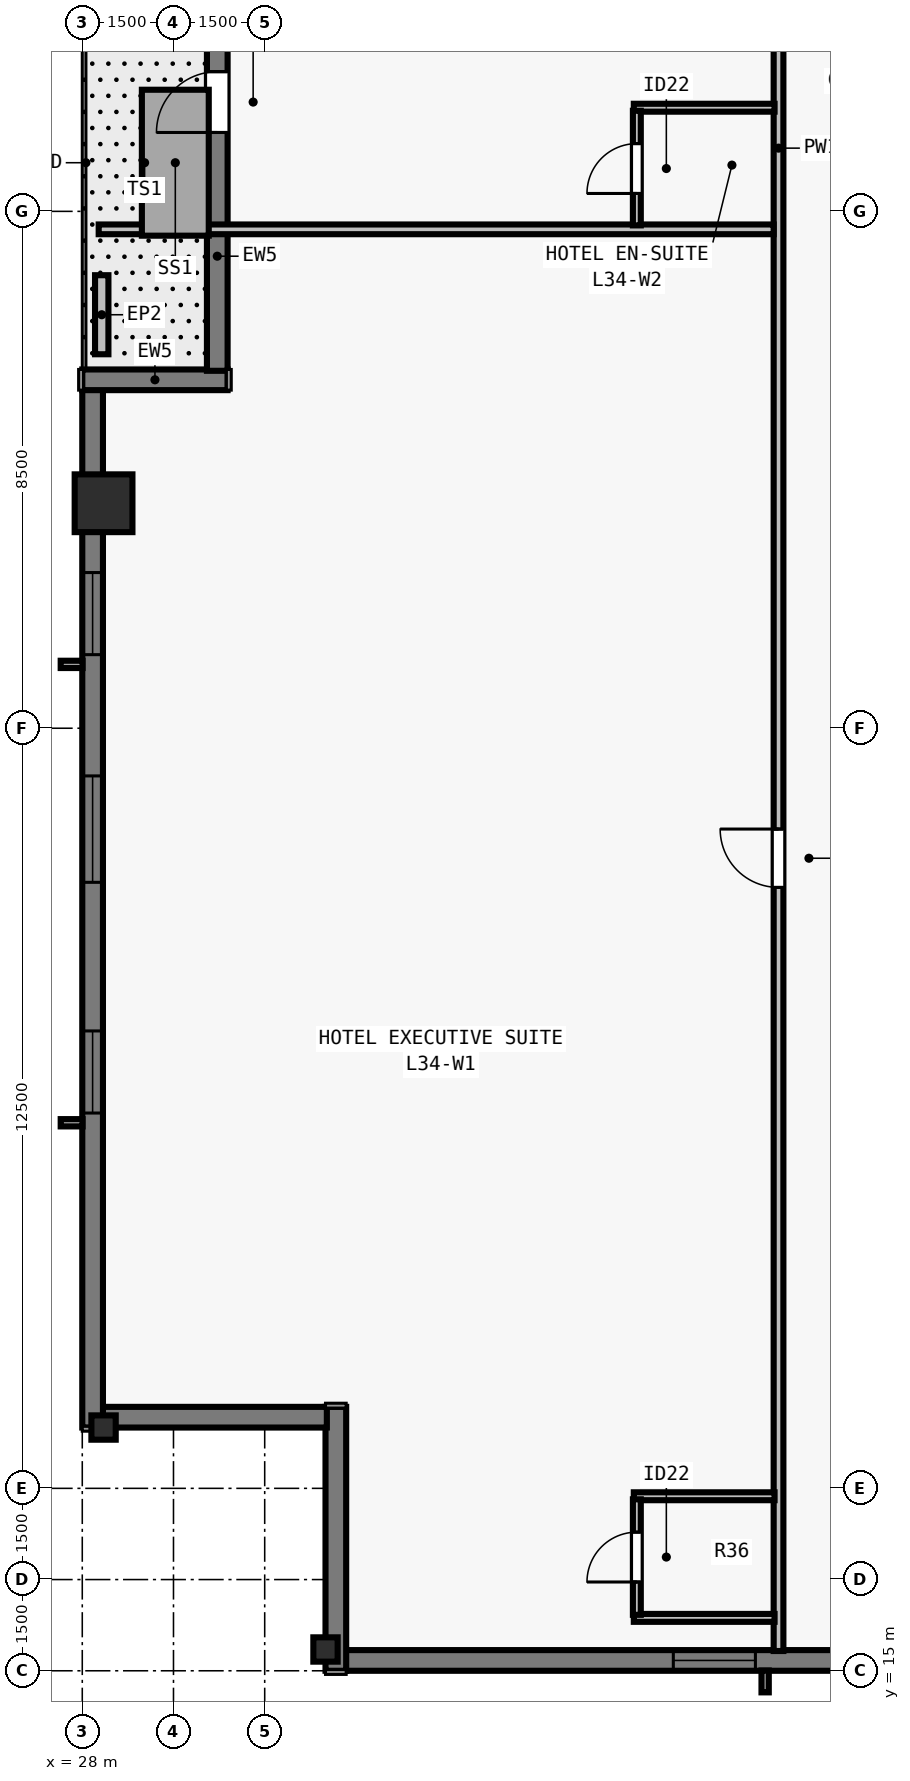
"""IFC4 building model, lengths in metres.
Left out: names, types, materials, properties, quantities, classifications, styles, units other than length and angle.
Written with IfcOpenShell. Run it as: python <this file> out.ifc"""

import sys

from ifc_helpers import new_model, si_unit, direction, frame, frame_2d, origin, origin_2d, place, context, subcontext, project, spatial, rectangle, i_section, extrude, element, fill, save


model = new_model("IFC4")
c1 = context("Model", 3, precision=1e-05, world=origin(), true_north=direction((0.0, 1.0)))
c2 = subcontext(c1, "Body", "Model", "MODEL_VIEW")
j1 = project(units=[si_unit("LENGTHUNIT", "METRE"), si_unit("PLANEANGLEUNIT", "RADIAN")], contexts=[c1])
p1 = place(None, origin())
s1 = spatial("IfcSite", under=j1, at=p1, CompositionType="ELEMENT")
p2 = place(p1, origin())
s2 = spatial("IfcBuilding", under=s1, at=p2, CompositionType="ELEMENT")
p3 = place(p2, frame((0.0, 0.0, 127.0)))
s3 = spatial("IfcBuildingStorey", under=s2, at=p3, CompositionType="ELEMENT", Elevation=127.0)
p4 = place(p3, frame((32.0, 15.35, 0.0), z_axis=(0.0, 0.0, 1.0), x_axis=(1.0, 0.0, 0.0)))
e1 = element("IfcColumn", 1, at=p4, inside=s3, PredefinedType="COLUMN", context=c2, shape_type="SweptSolid", body=[
    extrude(i_section(OverallWidth=0.4, OverallDepth=0.4, WebThickness=0.022, FlangeThickness=0.036, at=origin_2d()), origin(), (0.0, 0.0, 1.0), 3.5),
])
p5 = place(p3, frame((28.35, 34.2, 0.0), z_axis=(0.0, 0.0, 1.0), x_axis=(0.0, 1.0, 0.0)))
e2 = element("IfcColumn", 2, at=p5, inside=s3, PredefinedType="COLUMN", context=c2, shape_type="SweptSolid", body=[
    extrude(rectangle(XDim=0.95, YDim=0.95, at=origin_2d()), origin(), (0.0, 0.0, 1.0), 3.5),
])
p6 = place(p3, frame((28.35, 19.0, 0.0), z_axis=(0.0, 0.0, 1.0), x_axis=(0.0, 1.0, 0.0)))
e3 = element("IfcColumn", 3, at=p6, inside=s3, PredefinedType="COLUMN", context=c2, shape_type="SweptSolid", body=[
    extrude(i_section(OverallWidth=0.4, OverallDepth=0.4, WebThickness=0.022, FlangeThickness=0.036, at=origin_2d()), origin(), (0.0, 0.0, 1.0), 3.5),
])
p7 = place(p3, frame((72.0, 15.17, 0.0), z_axis=(0.0, 0.0, 1.0), x_axis=(-1.0, 0.0, 0.0)))
e4 = element("IfcWall", 4, at=p7, inside=s3, PredefinedType="SOLIDWALL", context=c2, shape_type="SweptSolid", body=[
    extrude(rectangle(XDim=39.682, YDim=0.34, at=frame_2d((19.841, 0.0))), origin(), (0.0, 0.0, 1.0), 3.28),
])
p8 = place(p7, frame((8.755, 0.0, 0.8)))
e5 = element("IfcOpeningElement", 5, at=p8, cuts=e4, PredefinedType="OPENING", context=c2, shape_type="SweptSolid", body=[
    extrude(rectangle(XDim=1.75, YDim=1.66, at=frame_2d((0.875, 0.83))), frame((0.0, 0.18, 0.0), z_axis=(0.0, -1.0, 0.0), x_axis=(1.0, 0.0, 0.0)), (0.0, 0.0, 1.0), 0.36),
])
p9 = place(p7, frame((12.059, 0.0, 0.8)))
e6 = element("IfcOpeningElement", 6, at=p9, cuts=e4, PredefinedType="OPENING", context=c2, shape_type="SweptSolid", body=[
    extrude(rectangle(XDim=1.35, YDim=1.66, at=frame_2d((0.675, 0.83))), frame((0.0, 0.18, 0.0), z_axis=(0.0, -1.0, 0.0), x_axis=(1.0, 0.0, 0.0)), (0.0, 0.0, 1.0), 0.36),
])
p10 = place(p7, frame((16.262, 0.0, 0.8)))
e7 = element("IfcOpeningElement", 7, at=p10, cuts=e4, PredefinedType="OPENING", context=c2, shape_type="SweptSolid", body=[
    extrude(rectangle(XDim=1.75, YDim=1.66, at=frame_2d((0.875, 0.83))), frame((0.0, 0.18, 0.0), z_axis=(0.0, -1.0, 0.0), x_axis=(1.0, 0.0, 0.0)), (0.0, 0.0, 1.0), 0.36),
])
p11 = place(p7, frame((19.166, 0.0, 0.8)))
e8 = element("IfcOpeningElement", 8, at=p11, cuts=e4, PredefinedType="OPENING", context=c2, shape_type="SweptSolid", body=[
    extrude(rectangle(XDim=1.35, YDim=1.66, at=frame_2d((0.675, 0.83))), frame((0.0, 0.18, 0.0), z_axis=(0.0, -1.0, 0.0), x_axis=(1.0, 0.0, 0.0)), (0.0, 0.0, 1.0), 0.36),
])
p12 = place(p7, frame((21.27, 0.0, 0.8)))
e9 = element("IfcOpeningElement", 9, at=p12, cuts=e4, PredefinedType="OPENING", context=c2, shape_type="SweptSolid", body=[
    extrude(rectangle(XDim=1.75, YDim=1.66, at=frame_2d((0.875, 0.83))), frame((0.0, 0.18, 0.0), z_axis=(0.0, -1.0, 0.0), x_axis=(1.0, 0.0, 0.0)), (0.0, 0.0, 1.0), 0.36),
])
p13 = place(p7, frame((26.273, 0.0, 0.8)))
e10 = element("IfcOpeningElement", 10, at=p13, cuts=e4, PredefinedType="OPENING", context=c2, shape_type="SweptSolid", body=[
    extrude(rectangle(XDim=1.35, YDim=1.66, at=frame_2d((0.675, 0.83))), frame((0.0, 0.18, 0.0), z_axis=(0.0, -1.0, 0.0), x_axis=(1.0, 0.0, 0.0)), (0.0, 0.0, 1.0), 0.36),
])
p14 = place(p7, frame((28.377, 0.0, 0.8)))
e11 = element("IfcOpeningElement", 11, at=p14, cuts=e4, PredefinedType="OPENING", context=c2, shape_type="SweptSolid", body=[
    extrude(rectangle(XDim=1.75, YDim=1.66, at=frame_2d((0.875, 0.83))), frame((0.0, 0.18, 0.0), z_axis=(0.0, -1.0, 0.0), x_axis=(1.0, 0.0, 0.0)), (0.0, 0.0, 1.0), 0.36),
])
p15 = place(p7, frame((32.93, 0.0, 0.8)))
e12 = element("IfcOpeningElement", 12, at=p15, cuts=e4, PredefinedType="OPENING", context=c2, shape_type="SweptSolid", body=[
    extrude(rectangle(XDim=1.35, YDim=1.66, at=frame_2d((0.675, 0.83))), frame((0.0, 0.18, 0.0), z_axis=(0.0, -1.0, 0.0), x_axis=(1.0, 0.0, 0.0)), (0.0, 0.0, 1.0), 0.36),
])
p16 = place(p3, frame((32.17, 15.0, 0.0), z_axis=(0.0, 0.0, 1.0), x_axis=(0.0, 1.0, 0.0)))
e13 = element("IfcWall", 13, at=p16, inside=s3, PredefinedType="SOLIDWALL", context=c2, shape_type="SweptSolid", body=[
    extrude(rectangle(XDim=4.34, YDim=0.34, at=frame_2d((2.17, 0.0))), origin(), (0.0, 0.0, 1.0), 3.28),
])
p17 = place(p3, frame((32.022, 19.17, 0.0), z_axis=(0.0, 0.0, 1.0), x_axis=(-1.0, 0.0, 0.0)))
e14 = element("IfcWall", 14, at=p17, inside=s3, PredefinedType="SOLIDWALL", context=c2, shape_type="SweptSolid", body=[
    extrude(rectangle(XDim=3.704, YDim=0.34, at=frame_2d((1.852, 0.0))), origin(), (0.0, 0.0, 1.0), 3.28),
])
p18 = place(p3, frame((28.17, 19.0, 0.0), z_axis=(0.0, 0.0, 1.0), x_axis=(0.0, 1.0, 0.0)))
e15 = element("IfcWall", 15, at=p18, inside=s3, PredefinedType="SOLIDWALL", context=c2, shape_type="SweptSolid", body=[
    extrude(rectangle(XDim=17.082, YDim=0.34, at=frame_2d((8.541, 0.0))), origin(), (0.0, 0.0, 1.0), 3.28),
])
p19 = place(p18, frame((5.172, 0.0, 0.8)))
e16 = element("IfcOpeningElement", 16, at=p19, cuts=e15, PredefinedType="OPENING", context=c2, shape_type="SweptSolid", body=[
    extrude(rectangle(XDim=1.35, YDim=1.66, at=frame_2d((0.675, 0.83))), frame((0.0, 0.18, 0.0), z_axis=(0.0, -1.0, 0.0), x_axis=(1.0, 0.0, 0.0)), (0.0, 0.0, 1.0), 0.36),
])
p20 = place(p18, frame((8.966, 0.0, 0.8)))
e17 = element("IfcOpeningElement", 17, at=p20, cuts=e15, PredefinedType="OPENING", context=c2, shape_type="SweptSolid", body=[
    extrude(rectangle(XDim=1.75, YDim=1.66, at=frame_2d((0.875, 0.83))), frame((0.0, 0.18, 0.0), z_axis=(0.0, -1.0, 0.0), x_axis=(1.0, 0.0, 0.0)), (0.0, 0.0, 1.0), 0.36),
])
p21 = place(p18, frame((12.71, 0.0, 0.8)))
e18 = element("IfcOpeningElement", 18, at=p21, cuts=e15, PredefinedType="OPENING", context=c2, shape_type="SweptSolid", body=[
    extrude(rectangle(XDim=1.35, YDim=1.66, at=frame_2d((0.675, 0.83))), frame((0.0, 0.18, 0.0), z_axis=(0.0, -1.0, 0.0), x_axis=(1.0, 0.0, 0.0)), (0.0, 0.0, 1.0), 0.36),
])
p22 = place(p3, frame((28.0, 36.23, 0.0), z_axis=(0.0, 0.0, 1.0), x_axis=(1.0, 0.0, 0.0)))
e19 = element("IfcWall", 19, at=p22, inside=s3, PredefinedType="SOLIDWALL", context=c2, shape_type="SweptSolid", body=[
    extrude(rectangle(XDim=2.39, YDim=0.34, at=frame_2d((1.195, 0.0))), origin(), (0.0, 0.0, 1.0), 3.28),
])
p23 = place(p3, frame((30.22, 36.378, 0.0), z_axis=(0.0, 0.0, 1.0), x_axis=(0.0, 1.0, 0.0)))
e20 = element("IfcWall", 20, at=p23, inside=s3, PredefinedType="SOLIDWALL", context=c2, shape_type="SweptSolid", body=[
    extrude(rectangle(XDim=7.162, YDim=0.34, at=frame_2d((3.581, 0.0))), origin(), (0.0, 0.0, 1.0), 3.28),
])
p24 = place(p23, frame((3.919, 0.0, 0.0)))
e21 = element("IfcOpeningElement", 21, at=p24, cuts=e20, PredefinedType="OPENING", context=c2, shape_type="SweptSolid", body=[
    extrude(rectangle(XDim=1.0, YDim=2.15, at=frame_2d((0.5, 1.075))), frame((0.0, 0.18, 0.0), z_axis=(0.0, -1.0, 0.0), x_axis=(1.0, 0.0, 0.0)), (0.0, 0.0, 1.0), 0.36),
])
p25 = place(p3, frame((28.32, 36.65, 0.0), z_axis=(0.0, 0.0, 1.0), x_axis=(0.0, 1.0, 0.0)))
e22 = element("IfcWall", 22, at=p25, inside=s3, PredefinedType="PARAPET", context=c2, shape_type="SweptSolid", body=[
    extrude(rectangle(XDim=1.3, YDim=0.22, at=frame_2d((0.65, 0.0))), origin(), (0.0, 0.0, 1.0), 0.55),
])
p26 = place(p3, frame((39.45, 15.325, 0.0), z_axis=(0.0, 0.0, 1.0), x_axis=(0.0, 1.0, 0.0)))
e23 = element("IfcWall", 23, at=p26, inside=s3, PredefinedType="PARTITIONING", context=c2, shape_type="SweptSolid", body=[
    extrude(rectangle(XDim=47.35, YDim=0.16, at=frame_2d((23.675, 0.0))), origin(), (0.0, 0.0, 1.0), 2.555),
])
p27 = place(p26, frame((12.557, 0.0, 0.0)))
e24 = element("IfcOpeningElement", 24, at=p27, cuts=e23, PredefinedType="OPENING", context=c2, shape_type="SweptSolid", body=[
    extrude(rectangle(XDim=0.96, YDim=2.15, at=frame_2d((0.48, 1.075))), frame((0.0, 0.09, 0.0), z_axis=(0.0, -1.0, 0.0), x_axis=(1.0, 0.0, 0.0)), (0.0, 0.0, 1.0), 0.18),
])
p28 = place(p26, frame((35.912, 0.0, 0.0)))
e25 = element("IfcOpeningElement", 25, at=p28, cuts=e23, PredefinedType="OPENING", context=c2, shape_type="SweptSolid", body=[
    extrude(rectangle(XDim=0.96, YDim=2.15, at=frame_2d((0.48, 1.075))), frame((0.0, 0.09, 0.0), z_axis=(0.0, -1.0, 0.0), x_axis=(1.0, 0.0, 0.0)), (0.0, 0.0, 1.0), 0.18),
])
for number, where, z_axis, x_axis in (
    (26, (37.07, 15.87, 0.0), (0.0, 0.0, 1.0), (1.0, 0.0, 0.0)),
    (27, (37.07, 17.87, 0.0), (0.0, 0.0, 1.0), (1.0, 0.0, 0.0)),
):
    element("IfcWall", number, at=place(p3, frame(where, z_axis=z_axis, x_axis=x_axis)), inside=s3, PredefinedType="PLUMBINGWALL", context=c2, shape_type="SweptSolid", body=[
        extrude(rectangle(XDim=2.315, YDim=0.13, at=frame_2d((1.157, 0.0))), origin(), (0.0, 0.0, 1.0), 3.28),
    ])
p29 = place(p3, frame((37.12, 15.92, 0.0), z_axis=(0.0, 0.0, 1.0), x_axis=(0.0, 1.0, 0.0)))
e28 = element("IfcWall", 28, at=p29, inside=s3, PredefinedType="PLUMBINGWALL", context=c2, shape_type="SweptSolid", body=[
    extrude(rectangle(XDim=1.9, YDim=0.13, at=frame_2d((0.95, 0.0))), origin(), (0.0, 0.0, 1.0), 3.28),
])
p30 = place(p29, frame((0.54, 0.0, 0.0)))
e29 = element("IfcOpeningElement", 29, at=p30, cuts=e28, PredefinedType="OPENING", context=c2, shape_type="SweptSolid", body=[
    extrude(rectangle(XDim=0.82, YDim=2.1, at=frame_2d((0.41, 1.05))), frame((0.0, 0.075, 0.0), z_axis=(0.0, -1.0, 0.0), x_axis=(1.0, 0.0, 0.0)), (0.0, 0.0, 1.0), 0.15),
])
p31 = place(p3, frame((28.27, 38.704, 0.0), z_axis=(0.0, 0.0, 1.0), x_axis=(1.0, 0.0, 0.0)))
e30 = element("IfcWall", 30, at=p31, inside=s3, PredefinedType="PARTITIONING", context=c2, shape_type="SweptSolid", body=[
    extrude(rectangle(XDim=11.1, YDim=0.16, at=frame_2d((5.55, 0.0))), origin(), (0.0, 0.0, 1.0), 2.896),
])
p32 = place(p3, frame((37.07, 40.704, 0.0), z_axis=(0.0, 0.0, 1.0), x_axis=(1.0, 0.0, 0.0)))
e31 = element("IfcWall", 31, at=p32, inside=s3, PredefinedType="PLUMBINGWALL", context=c2, shape_type="SweptSolid", body=[
    extrude(rectangle(XDim=2.315, YDim=0.13, at=frame_2d((1.157, 0.0))), origin(), (0.0, 0.0, 1.0), 3.28),
])
p33 = place(p3, frame((37.12, 38.769, 0.0), z_axis=(0.0, 0.0, 1.0), x_axis=(0.0, 1.0, 0.0)))
e32 = element("IfcWall", 32, at=p33, inside=s3, PredefinedType="PLUMBINGWALL", context=c2, shape_type="SweptSolid", body=[
    extrude(rectangle(XDim=1.885, YDim=0.13, at=frame_2d((0.942, 0.0))), origin(), (0.0, 0.0, 1.0), 3.28),
])
p34 = place(p33, frame((0.525, 0.0, 0.0)))
e33 = element("IfcOpeningElement", 33, at=p34, cuts=e32, PredefinedType="OPENING", context=c2, shape_type="SweptSolid", body=[
    extrude(rectangle(XDim=0.82, YDim=2.1, at=frame_2d((0.41, 1.05))), frame((0.0, 0.075, 0.0), z_axis=(0.0, -1.0, 0.0), x_axis=(1.0, 0.0, 0.0)), (0.0, 0.0, 1.0), 0.15),
])
p35 = place(p15, origin())
e34 = element("IfcWindow", 34, at=p35, inside=s3, PartitioningType="SINGLE_PANEL", PredefinedType="WINDOW", context=c2, shape_type="SweptSolid", body=[
    extrude(rectangle(XDim=1.35, YDim=1.66, at=frame_2d((0.675, 0.83))), frame((0.0, -0.05, 0.0), z_axis=(0.0, -1.0, 0.0), x_axis=(1.0, 0.0, 0.0)), (0.0, 0.0, 1.0), 0.06),
])
fill(e12, e34)
p36 = place(p19, origin())
e35 = element("IfcWindow", 35, at=p36, inside=s3, PartitioningType="SINGLE_PANEL", PredefinedType="WINDOW", context=c2, shape_type="SweptSolid", body=[
    extrude(rectangle(XDim=1.35, YDim=1.66, at=frame_2d((0.675, 0.83))), frame((0.0, -0.05, 0.0), z_axis=(0.0, -1.0, 0.0), x_axis=(1.0, 0.0, 0.0)), (0.0, 0.0, 1.0), 0.06),
])
fill(e16, e35)
p37 = place(p20, origin())
e36 = element("IfcWindow", 36, at=p37, inside=s3, PartitioningType="SINGLE_PANEL", PredefinedType="WINDOW", context=c2, shape_type="SweptSolid", body=[
    extrude(rectangle(XDim=1.75, YDim=1.66, at=frame_2d((0.875, 0.83))), frame((0.0, -0.05, 0.0), z_axis=(0.0, -1.0, 0.0), x_axis=(1.0, 0.0, 0.0)), (0.0, 0.0, 1.0), 0.06),
])
fill(e17, e36)
p38 = place(p21, origin())
e37 = element("IfcWindow", 37, at=p38, inside=s3, PartitioningType="SINGLE_PANEL", PredefinedType="WINDOW", context=c2, shape_type="SweptSolid", body=[
    extrude(rectangle(XDim=1.35, YDim=1.66, at=frame_2d((0.675, 0.83))), frame((0.0, -0.05, 0.0), z_axis=(0.0, -1.0, 0.0), x_axis=(1.0, 0.0, 0.0)), (0.0, 0.0, 1.0), 0.06),
])
fill(e18, e37)
p39 = place(p24, origin())
e38 = element("IfcDoor", 38, at=p39, inside=s3, OperationType="SINGLE_SWING_LEFT", PredefinedType="DOOR", context=c2, shape_type="SweptSolid", body=[
    extrude(rectangle(XDim=1.0, YDim=2.15, at=frame_2d((0.5, 1.075))), frame((0.0, 0.025, 0.0), z_axis=(0.0, -1.0, 0.0), x_axis=(1.0, 0.0, 0.0)), (0.0, 0.0, 1.0), 0.05),
])
fill(e21, e38)
p40 = place(p30, origin())
e39 = element("IfcDoor", 39, at=p40, inside=s3, OperationType="SINGLE_SWING_LEFT", PredefinedType="DOOR", context=c2, shape_type="SweptSolid", body=[
    extrude(rectangle(XDim=0.82, YDim=2.1, at=frame_2d((0.41, 1.05))), frame((0.0, 0.025, 0.0), z_axis=(0.0, -1.0, 0.0), x_axis=(1.0, 0.0, 0.0)), (0.0, 0.0, 1.0), 0.05),
])
fill(e29, e39)
p41 = place(p27, origin())
e40 = element("IfcDoor", 40, at=p41, inside=s3, OperationType="SINGLE_SWING_RIGHT", PredefinedType="DOOR", context=c2, shape_type="SweptSolid", body=[
    extrude(rectangle(XDim=0.96, YDim=2.15, at=frame_2d((0.48, 1.075))), frame((0.0, 0.025, 0.0), z_axis=(0.0, -1.0, 0.0), x_axis=(1.0, 0.0, 0.0)), (0.0, 0.0, 1.0), 0.05),
])
fill(e24, e40)
p42 = place(p34, origin())
e41 = element("IfcDoor", 41, at=p42, inside=s3, OperationType="SINGLE_SWING_LEFT", PredefinedType="DOOR", context=c2, shape_type="SweptSolid", body=[
    extrude(rectangle(XDim=0.82, YDim=2.1, at=frame_2d((0.41, 1.05))), frame((0.0, 0.025, 0.0), z_axis=(0.0, -1.0, 0.0), x_axis=(1.0, 0.0, 0.0)), (0.0, 0.0, 1.0), 0.05),
])
fill(e33, e41)
save(model, sys.argv[1])
